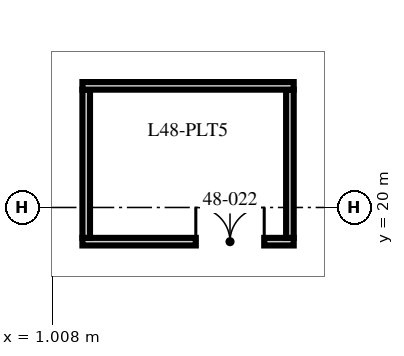
"""IFC4 building model, lengths in metres.
Left out: names, types, materials, properties, quantities, classifications, styles, units other than length and angle.
Written with IfcOpenShell. Run it as: python <this file> out.ifc"""

import sys

from ifc_helpers import new_model, si_unit, direction, frame, frame_2d, origin, origin_2d, place, context, subcontext, project, spatial, rectangle, hollow_rectangle, extrude, element, fill, save


model = new_model("IFC4")
c1 = context("Model", 3, precision=1e-05, world=origin(), true_north=direction((0.0, 1.0)))
c2 = subcontext(c1, "Body", "Model", "MODEL_VIEW")
j1 = project(units=[si_unit("LENGTHUNIT", "METRE"), si_unit("PLANEANGLEUNIT", "RADIAN")], contexts=[c1])
p1 = place(None, origin())
s1 = spatial("IfcSite", under=j1, at=p1, CompositionType="ELEMENT")
p2 = place(p1, origin())
s2 = spatial("IfcBuilding", under=s1, at=p2, CompositionType="ELEMENT")
p3 = place(p2, frame((0.0, 0.0, 192.0)))
s3 = spatial("IfcBuildingStorey", under=s2, at=p3, CompositionType="ELEMENT", Elevation=192.0)
p4 = place(p3, frame((0.0, 27.1, -0.65), z_axis=(0.0, -0.334792284074, 0.942291953974), x_axis=(1.0, 0.0, 0.0)))
e1 = element("IfcColumn", 1, at=p4, inside=s3, PredefinedType="COLUMN", context=c2, shape_type="SweptSolid", body=[
    extrude(hollow_rectangle(XDim=3.2, YDim=1.8, WallThickness=0.2, at=origin_2d()), origin(), (0.0, 0.0, 1.0), 8.065),
])
p5 = place(p3, frame((9.16, 27.1, -0.65), z_axis=(-0.103570687408, -0.332991803119, 0.937224397765), x_axis=(0.994622092871, -0.034607128924, 0.097617821118)))
e2 = element("IfcColumn", 2, at=p5, inside=s3, PredefinedType="COLUMN", context=c2, shape_type="SweptSolid", body=[
    extrude(hollow_rectangle(XDim=3.2, YDim=1.8, WallThickness=0.2, at=origin_2d()), origin(), (0.0, 0.0, 1.0), 8.109),
])
p6 = place(p3, frame((1.8, 19.1, 0.0), z_axis=(0.0, 0.0, 1.0), x_axis=(1.0, 0.0, 0.0)))
e3 = element("IfcWall", 3, at=p6, inside=s3, PredefinedType="SOLIDWALL", context=c2, shape_type="SweptSolid", body=[
    extrude(rectangle(XDim=5.56, YDim=0.2, at=frame_2d((2.78, 0.0))), origin(), (0.0, 0.0, 1.0), 6.56),
])
p7 = place(p6, frame((2.984, 0.0, 0.0)))
e4 = element("IfcOpeningElement", 4, at=p7, cuts=e3, PredefinedType="OPENING", context=c2, shape_type="SweptSolid", body=[
    extrude(rectangle(XDim=1.8, YDim=2.4, at=frame_2d((0.9, 1.2))), frame((0.0, 0.11, 0.0), z_axis=(0.0, -1.0, 0.0), x_axis=(1.0, 0.0, 0.0)), (0.0, 0.0, 1.0), 0.22),
])
for number, where, z_axis, x_axis in (
    (5, (1.9, 19.2, 0.0), (0.0, 0.0, 1.0), (0.0, 1.0, 0.0)),
    (6, (7.26, 19.2, 0.0), (0.0, 0.0, 1.0), (0.0, 1.0, 0.0)),
):
    element("IfcWall", number, at=place(p3, frame(where, z_axis=z_axis, x_axis=x_axis)), inside=s3, PredefinedType="SOLIDWALL", context=c2, shape_type="SweptSolid", body=[
        extrude(rectangle(XDim=3.9, YDim=0.2, at=frame_2d((1.95, 0.0))), origin(), (0.0, 0.0, 1.0), 7.25),
    ])
p8 = place(p3, frame((1.8, 23.2, 0.0), z_axis=(0.0, 0.0, 1.0), x_axis=(1.0, 0.0, 0.0)))
e7 = element("IfcWall", 7, at=p8, inside=s3, PredefinedType="SOLIDWALL", context=c2, shape_type="SweptSolid", body=[
    extrude(rectangle(XDim=5.56, YDim=0.2, at=frame_2d((2.78, 0.0))), origin(), (0.0, 0.0, 1.0), 6.56),
])
p9 = place(p7, origin())
e8 = element("IfcDoor", 8, at=p9, inside=s3, OperationType="DOUBLE_DOOR_SINGLE_SWING", PredefinedType="DOOR", context=c2, shape_type="SweptSolid", body=[
    extrude(rectangle(XDim=1.8, YDim=2.4, at=frame_2d((0.9, 1.2))), frame((0.0, 0.025, 0.0), z_axis=(0.0, -1.0, 0.0), x_axis=(1.0, 0.0, 0.0)), (0.0, 0.0, 1.0), 0.05),
])
fill(e4, e8)
save(model, sys.argv[1])
